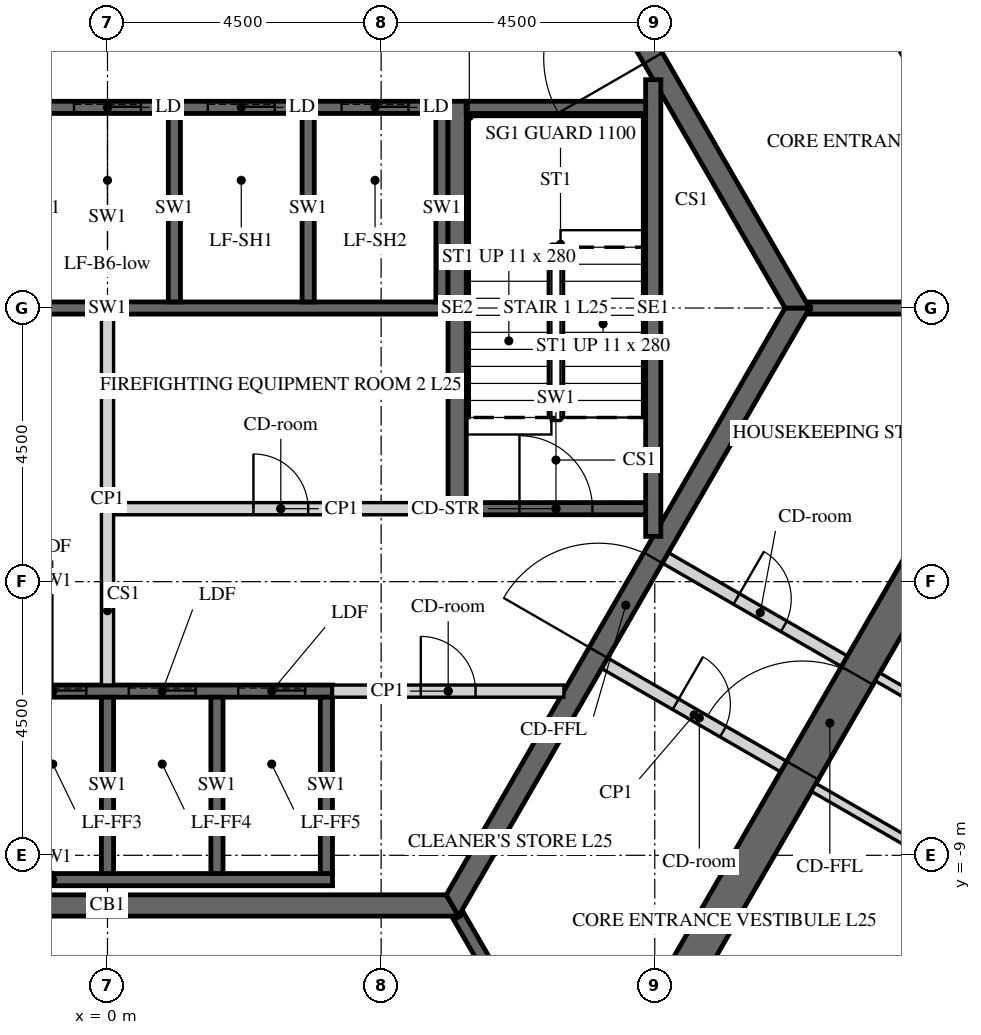
"""IFC4 building model, lengths in metres.
Left out: names, types, materials, properties, quantities, classifications, styles, units other than length and angle.
Written with IfcOpenShell. Run it as: python <this file> out.ifc"""

import sys

from ifc_helpers import new_model, si_unit, direction, frame, frame_2d, origin, place, context, subcontext, project, spatial, polyline, rectangle, outline, extrude, element, fill, save


model = new_model("IFC4")
c1 = context("Model", 3, precision=1e-05, world=origin(), true_north=direction((0.0, 1.0)))
c2 = subcontext(c1, "Body", "Model", "MODEL_VIEW")
j1 = project(units=[si_unit("LENGTHUNIT", "METRE"), si_unit("PLANEANGLEUNIT", "RADIAN")], contexts=[c1])
p1 = place(None, origin())
s1 = spatial("IfcSite", under=j1, at=p1, CompositionType="ELEMENT")
p2 = place(p1, origin())
s2 = spatial("IfcBuilding", under=s1, at=p2, CompositionType="ELEMENT")
p3 = place(p2, frame((0.0, 0.0, 111.6)))
s3 = spatial("IfcBuildingStorey", under=s2, at=p3, CompositionType="ELEMENT", Elevation=111.6)
p4 = place(p3, frame((7.91, -13.7, -0.15), z_axis=(0.0, 0.0, 1.0), x_axis=(0.499999880136, 0.866025472988, 0.0)))
e1 = element("IfcWall", 1, at=p4, inside=s3, PredefinedType="SHEAR", context=c2, shape_type="SweptSolid", body=[
    extrude(outline(polyline([(-0.173, -0.3), (15.993, -0.3), (15.646, 0.3), (0.173, 0.3), (-0.173, -0.3)])), origin(), (0.0, 0.0, 1.0), 3.9),
])
p5 = place(p4, frame((7.039, 0.0, 0.15)))
e2 = element("IfcOpeningElement", 2, at=p5, cuts=e1, PredefinedType="OPENING", context=c2, shape_type="SweptSolid", body=[
    extrude(rectangle(XDim=1.8, YDim=2.4, at=frame_2d((0.9, 1.2))), frame((0.0, 0.31, 0.0), z_axis=(0.0, -1.0, 0.0), x_axis=(1.0, 0.0, 0.0)), (0.0, 0.0, 1.0), 0.62),
])
p6 = place(p3, frame((15.819, 0.0, -0.15), z_axis=(0.0, 0.0, 1.0), x_axis=(-0.499999880136, 0.866025472988, 0.0)))
e3 = element("IfcWall", 3, at=p6, inside=s3, PredefinedType="SHEAR", context=c2, shape_type="SweptSolid", body=[
    extrude(outline(polyline([(-0.173, -0.3), (15.993, -0.3), (15.646, 0.3), (0.173, 0.3), (-0.173, -0.3)])), origin(), (0.0, 0.0, 1.0), 3.9),
])
p7 = place(p6, frame((6.981, 0.0, 0.15)))
e4 = element("IfcOpeningElement", 4, at=p7, cuts=e3, PredefinedType="OPENING", context=c2, shape_type="SweptSolid", body=[
    extrude(rectangle(XDim=1.8, YDim=2.4, at=frame_2d((0.9, 1.2))), frame((0.0, 0.31, 0.0), z_axis=(0.0, -1.0, 0.0), x_axis=(1.0, 0.0, 0.0)), (0.0, 0.0, 1.0), 0.62),
])
p8 = place(p3, frame((-5.673, -9.825, -0.15), z_axis=(0.0, 0.0, 1.0), x_axis=(1.0, 0.0, 0.0)))
e5 = element("IfcWall", 5, at=p8, inside=s3, PredefinedType="SHEAR", context=c2, shape_type="SweptSolid", body=[
    extrude(outline(polyline([(-0.101, -0.175), (11.446, -0.175), (11.244, 0.175), (0.101, 0.175), (-0.101, -0.175)])), origin(), (0.0, 0.0, 1.0), 3.9),
])
p9 = place(p3, frame((5.673, -9.825, -0.15), z_axis=(0.0, 0.0, 1.0), x_axis=(0.499995046907, 0.866028263435, 0.0)))
e6 = element("IfcWall", 6, at=p9, inside=s3, PredefinedType="SHEAR", context=c2, shape_type="SweptSolid", body=[
    extrude(outline(polyline([(-0.101, -0.175), (11.446, -0.175), (11.244, 0.175), (0.101, 0.175), (-0.101, -0.175)])), origin(), (0.0, 0.0, 1.0), 3.9),
])
p10 = place(p9, frame((4.801, 0.0, 0.15)))
e7 = element("IfcOpeningElement", 7, at=p10, cuts=e6, PredefinedType="OPENING", context=c2, shape_type="SweptSolid", body=[
    extrude(rectangle(XDim=1.8, YDim=2.4, at=frame_2d((0.9, 1.2))), frame((0.0, 0.185, 0.0), z_axis=(0.0, -1.0, 0.0), x_axis=(1.0, 0.0, 0.0)), (0.0, 0.0, 1.0), 0.37),
])
p11 = place(p3, frame((11.345, 0.0, -0.15), z_axis=(0.0, 0.0, 1.0), x_axis=(-0.499995046907, 0.866028263435, 0.0)))
e8 = element("IfcWall", 8, at=p11, inside=s3, PredefinedType="SHEAR", context=c2, shape_type="SweptSolid", body=[
    extrude(outline(polyline([(-0.101, -0.175), (11.446, -0.175), (11.244, 0.175), (0.101, 0.175), (-0.101, -0.175)])), origin(), (0.0, 0.0, 1.0), 3.9),
])
p12 = place(p11, frame((4.744, 0.0, 0.15)))
e9 = element("IfcOpeningElement", 9, at=p12, cuts=e8, PredefinedType="OPENING", context=c2, shape_type="SweptSolid", body=[
    extrude(rectangle(XDim=1.8, YDim=2.4, at=frame_2d((0.9, 1.2))), frame((0.0, 0.185, 0.0), z_axis=(0.0, -1.0, 0.0), x_axis=(1.0, 0.0, 0.0)), (0.0, 0.0, 1.0), 0.37),
])
p13 = place(p3, frame((-5.6, 3.3, -0.25), z_axis=(0.0, 0.0, 1.0), x_axis=(1.0, 0.0, 0.0)))
e10 = element("IfcWall", 10, at=p13, inside=s3, PredefinedType="SHEAR", context=c2, shape_type="SweptSolid", body=[
    extrude(rectangle(XDim=11.2, YDim=0.2, at=frame_2d((5.6, 0.0))), origin(), (0.0, 0.0, 1.0), 3.9),
])
p14 = place(p13, frame((0.65, 0.0, 0.25)))
e11 = element("IfcOpeningElement", 11, at=p14, cuts=e10, PredefinedType="OPENING", context=c2, shape_type="SweptSolid", body=[
    extrude(rectangle(XDim=1.1, YDim=2.1, at=frame_2d((0.55, 1.05))), frame((0.0, 0.11, 0.0), z_axis=(0.0, -1.0, 0.0), x_axis=(1.0, 0.0, 0.0)), (0.0, 0.0, 1.0), 0.22),
])
p15 = place(p13, frame((2.85, 0.0, 0.25)))
e12 = element("IfcOpeningElement", 12, at=p15, cuts=e10, PredefinedType="OPENING", context=c2, shape_type="SweptSolid", body=[
    extrude(rectangle(XDim=1.1, YDim=2.1, at=frame_2d((0.55, 1.05))), frame((0.0, 0.11, 0.0), z_axis=(0.0, -1.0, 0.0), x_axis=(1.0, 0.0, 0.0)), (0.0, 0.0, 1.0), 0.22),
])
p16 = place(p13, frame((5.05, 0.0, 0.25)))
e13 = element("IfcOpeningElement", 13, at=p16, cuts=e10, PredefinedType="OPENING", context=c2, shape_type="SweptSolid", body=[
    extrude(rectangle(XDim=1.1, YDim=2.1, at=frame_2d((0.55, 1.05))), frame((0.0, 0.11, 0.0), z_axis=(0.0, -1.0, 0.0), x_axis=(1.0, 0.0, 0.0)), (0.0, 0.0, 1.0), 0.22),
])
p17 = place(p13, frame((7.25, 0.0, 0.25)))
e14 = element("IfcOpeningElement", 14, at=p17, cuts=e10, PredefinedType="OPENING", context=c2, shape_type="SweptSolid", body=[
    extrude(rectangle(XDim=1.1, YDim=2.1, at=frame_2d((0.55, 1.05))), frame((0.0, 0.11, 0.0), z_axis=(0.0, -1.0, 0.0), x_axis=(1.0, 0.0, 0.0)), (0.0, 0.0, 1.0), 0.22),
])
p18 = place(p13, frame((9.45, 0.0, 0.25)))
e15 = element("IfcOpeningElement", 15, at=p18, cuts=e10, PredefinedType="OPENING", context=c2, shape_type="SweptSolid", body=[
    extrude(rectangle(XDim=1.1, YDim=2.1, at=frame_2d((0.55, 1.05))), frame((0.0, 0.11, 0.0), z_axis=(0.0, -1.0, 0.0), x_axis=(1.0, 0.0, 0.0)), (0.0, 0.0, 1.0), 0.22),
])
p19 = place(p3, frame((-5.6, 0.0, -0.25), z_axis=(0.0, 0.0, 1.0), x_axis=(1.0, 0.0, 0.0)))
e16 = element("IfcWall", 16, at=p19, inside=s3, PredefinedType="SHEAR", context=c2, shape_type="SweptSolid", body=[
    extrude(rectangle(XDim=11.2, YDim=0.2, at=frame_2d((5.6, 0.0))), origin(), (0.0, 0.0, 1.0), 3.9),
])
for number, where, z_axis, x_axis in (
    (17, (1.1, 0.1, -0.25), (0.0, 0.0, 1.0), (0.0, 1.0, 0.0)),
    (18, (3.3, 0.1, -0.25), (0.0, 0.0, 1.0), (0.0, 1.0, 0.0)),
    (19, (5.5, 0.1, -0.25), (0.0, 0.0, 1.0), (0.0, 1.0, 0.0)),
):
    element("IfcWall", number, at=place(p3, frame(where, z_axis=z_axis, x_axis=x_axis)), inside=s3, PredefinedType="SHEAR", context=c2, shape_type="SweptSolid", body=[
        extrude(rectangle(XDim=3.1, YDim=0.2, at=frame_2d((1.55, 0.0))), origin(), (0.0, 0.0, 1.0), 3.9),
    ])
p20 = place(p3, frame((-5.5, -6.3, -0.25), z_axis=(0.0, 0.0, 1.0), x_axis=(1.0, 0.0, 0.0)))
e20 = element("IfcWall", 20, at=p20, inside=s3, PredefinedType="SHEAR", context=c2, shape_type="SweptSolid", body=[
    extrude(rectangle(XDim=9.2, YDim=0.2, at=frame_2d((4.6, 0.0))), origin(), (0.0, 0.0, 1.0), 3.9),
])
p21 = place(p20, frame((0.45, 0.0, 0.25)))
e21 = element("IfcOpeningElement", 21, at=p21, cuts=e20, PredefinedType="OPENING", context=c2, shape_type="SweptSolid", body=[
    extrude(rectangle(XDim=1.1, YDim=2.1, at=frame_2d((0.55, 1.05))), frame((0.0, 0.11, 0.0), z_axis=(0.0, -1.0, 0.0), x_axis=(1.0, 0.0, 0.0)), (0.0, 0.0, 1.0), 0.22),
])
p22 = place(p20, frame((2.25, 0.0, 0.25)))
e22 = element("IfcOpeningElement", 22, at=p22, cuts=e20, PredefinedType="OPENING", context=c2, shape_type="SweptSolid", body=[
    extrude(rectangle(XDim=1.1, YDim=2.1, at=frame_2d((0.55, 1.05))), frame((0.0, 0.11, 0.0), z_axis=(0.0, -1.0, 0.0), x_axis=(1.0, 0.0, 0.0)), (0.0, 0.0, 1.0), 0.22),
])
p23 = place(p20, frame((4.05, 0.0, 0.25)))
e23 = element("IfcOpeningElement", 23, at=p23, cuts=e20, PredefinedType="OPENING", context=c2, shape_type="SweptSolid", body=[
    extrude(rectangle(XDim=1.1, YDim=2.1, at=frame_2d((0.55, 1.05))), frame((0.0, 0.11, 0.0), z_axis=(0.0, -1.0, 0.0), x_axis=(1.0, 0.0, 0.0)), (0.0, 0.0, 1.0), 0.22),
])
p24 = place(p20, frame((5.85, 0.0, 0.25)))
e24 = element("IfcOpeningElement", 24, at=p24, cuts=e20, PredefinedType="OPENING", context=c2, shape_type="SweptSolid", body=[
    extrude(rectangle(XDim=1.1, YDim=2.1, at=frame_2d((0.55, 1.05))), frame((0.0, 0.11, 0.0), z_axis=(0.0, -1.0, 0.0), x_axis=(1.0, 0.0, 0.0)), (0.0, 0.0, 1.0), 0.22),
])
p25 = place(p20, frame((7.65, 0.0, 0.25)))
e25 = element("IfcOpeningElement", 25, at=p25, cuts=e20, PredefinedType="OPENING", context=c2, shape_type="SweptSolid", body=[
    extrude(rectangle(XDim=1.1, YDim=2.1, at=frame_2d((0.55, 1.05))), frame((0.0, 0.11, 0.0), z_axis=(0.0, -1.0, 0.0), x_axis=(1.0, 0.0, 0.0)), (0.0, 0.0, 1.0), 0.22),
])
p26 = place(p3, frame((-5.5, -9.4, -0.25), z_axis=(0.0, 0.0, 1.0), x_axis=(1.0, 0.0, 0.0)))
e26 = element("IfcWall", 26, at=p26, inside=s3, PredefinedType="SHEAR", context=c2, shape_type="SweptSolid", body=[
    extrude(rectangle(XDim=9.2, YDim=0.2, at=frame_2d((4.6, 0.0))), origin(), (0.0, 0.0, 1.0), 3.9),
])
for number, where, z_axis, x_axis in (
    (27, (0.0, -9.3, -0.25), (0.0, 0.0, 1.0), (0.0, 1.0, 0.0)),
    (28, (1.8, -9.3, -0.25), (0.0, 0.0, 1.0), (0.0, 1.0, 0.0)),
    (29, (3.6, -9.3, -0.25), (0.0, 0.0, 1.0), (0.0, 1.0, 0.0)),
):
    element("IfcWall", number, at=place(p3, frame(where, z_axis=z_axis, x_axis=x_axis)), inside=s3, PredefinedType="SHEAR", context=c2, shape_type="SweptSolid", body=[
        extrude(rectangle(XDim=2.9, YDim=0.2, at=frame_2d((1.45, 0.0))), origin(), (0.0, 0.0, 1.0), 3.9),
    ])
p27 = place(p3, frame((0.1, -3.3, 0.0), z_axis=(0.0, 0.0, 1.0), x_axis=(1.0, 0.0, 0.0)))
e30 = element("IfcWall", 30, at=p27, inside=s3, PredefinedType="PARTITIONING", context=c2, shape_type="SweptSolid", body=[
    extrude(rectangle(XDim=5.5, YDim=0.2, at=frame_2d((2.75, 0.0))), origin(), (0.0, 0.0, 1.0), 3.65),
])
p28 = place(p27, frame((2.3, 0.0, 0.0)))
e31 = element("IfcOpeningElement", 31, at=p28, cuts=e30, PredefinedType="OPENING", context=c2, shape_type="SweptSolid", body=[
    extrude(rectangle(XDim=0.9, YDim=2.1, at=frame_2d((0.45, 1.05))), frame((0.0, 0.11, 0.0), z_axis=(0.0, -1.0, 0.0), x_axis=(1.0, 0.0, 0.0)), (0.0, 0.0, 1.0), 0.22),
])
p29 = place(p3, frame((0.0, -6.2, 0.0), z_axis=(0.0, 0.0, 1.0), x_axis=(0.0, 1.0, 0.0)))
e32 = element("IfcWall", 32, at=p29, inside=s3, PredefinedType="PARTITIONING", context=c2, shape_type="SweptSolid", body=[
    extrude(rectangle(XDim=6.1, YDim=0.2, at=frame_2d((3.05, 0.0))), origin(), (0.0, 0.0, 1.0), 3.65),
])
p30 = place(p3, frame((3.7, -6.3, 0.0), z_axis=(0.0, 0.0, 1.0), x_axis=(1.0, 0.0, 0.0)))
e33 = element("IfcWall", 33, at=p30, inside=s3, PredefinedType="PARTITIONING", context=c2, shape_type="SweptSolid", body=[
    extrude(rectangle(XDim=3.806, YDim=0.2, at=frame_2d((1.903, 0.0))), origin(), (0.0, 0.0, 1.0), 3.65),
])
p31 = place(p30, frame((1.453, 0.0, 0.0)))
e34 = element("IfcOpeningElement", 34, at=p31, cuts=e33, PredefinedType="OPENING", context=c2, shape_type="SweptSolid", body=[
    extrude(rectangle(XDim=0.9, YDim=2.1, at=frame_2d((0.45, 1.05))), frame((0.0, 0.11, 0.0), z_axis=(0.0, -1.0, 0.0), x_axis=(1.0, 0.0, 0.0)), (0.0, 0.0, 1.0), 0.22),
])
p32 = place(p3, frame((11.547, 0.0, -0.15), z_axis=(0.0, 0.0, 1.0), x_axis=(1.0, 0.0, 0.0)))
e35 = element("IfcWall", 35, at=p32, inside=s3, PredefinedType="SHEAR", context=c2, shape_type="SweptSolid", body=[
    extrude(rectangle(XDim=3.926, YDim=0.2, at=frame_2d((1.963, 0.0))), origin(), (0.0, 0.0, 1.0), 3.9),
])
p33 = place(p3, frame((5.773, -10.0, -0.15), z_axis=(0.0, 0.0, 1.0), x_axis=(0.500038251005, -0.86600331843, 0.0)))
e36 = element("IfcWall", 36, at=p33, inside=s3, PredefinedType="SHEAR", context=c2, shape_type="SweptSolid", body=[
    extrude(rectangle(XDim=3.926, YDim=0.2, at=frame_2d((1.963, 0.0))), origin(), (0.0, 0.0, 1.0), 3.9),
])
p34 = place(p3, frame((9.175, -4.109, 0.0), z_axis=(0.0, 0.0, 1.0), x_axis=(0.865989465428, -0.500062241894, 0.0)))
e37 = element("IfcWall", 37, at=p34, inside=s3, PredefinedType="PARTITIONING", context=c2, shape_type="SweptSolid", body=[
    extrude(rectangle(XDim=3.4, YDim=0.2, at=frame_2d((1.7, 0.0))), origin(), (0.0, 0.0, 1.0), 3.65),
])
p35 = place(p34, frame((1.351, 0.0, 0.0)))
e38 = element("IfcOpeningElement", 38, at=p35, cuts=e37, PredefinedType="OPENING", context=c2, shape_type="SweptSolid", body=[
    extrude(rectangle(XDim=0.9, YDim=2.1, at=frame_2d((0.45, 1.05))), frame((0.0, 0.11, 0.0), z_axis=(0.0, -1.0, 0.0), x_axis=(1.0, 0.0, 0.0)), (0.0, 0.0, 1.0), 0.22),
])
p36 = place(p3, frame((8.175, -5.841, 0.0), z_axis=(0.0, 0.0, 1.0), x_axis=(0.866020560687, -0.500008388397, 0.0)))
e39 = element("IfcWall", 39, at=p36, inside=s3, PredefinedType="PARTITIONING", context=c2, shape_type="SweptSolid", body=[
    extrude(rectangle(XDim=3.4, YDim=0.2, at=frame_2d((1.7, 0.0))), origin(), (0.0, 0.0, 1.0), 3.65),
])
p37 = place(p36, frame((1.35, 0.0, 0.0)))
e40 = element("IfcOpeningElement", 40, at=p37, cuts=e39, PredefinedType="OPENING", context=c2, shape_type="SweptSolid", body=[
    extrude(rectangle(XDim=0.9, YDim=2.1, at=frame_2d((0.45, 1.05))), frame((0.0, 0.11, 0.0), z_axis=(0.0, -1.0, 0.0), x_axis=(1.0, 0.0, 0.0)), (0.0, 0.0, 1.0), 0.22),
])
p38 = place(p3, frame((5.75, -3.4, -0.25), z_axis=(0.0, 0.0, 1.0), x_axis=(0.0, 1.0, 0.0)))
e41 = element("IfcWall", 41, at=p38, inside=s3, PredefinedType="SHEAR", context=c2, shape_type="SweptSolid", body=[
    extrude(rectangle(XDim=6.8, YDim=0.3, at=frame_2d((3.4, 0.0))), origin(), (0.0, 0.0, 1.0), 3.9),
])
p39 = place(p3, frame((8.975, -3.755, -0.25), z_axis=(0.0, 0.0, 1.0), x_axis=(0.0, 1.0, 0.0)))
e42 = element("IfcWall", 42, at=p39, inside=s3, PredefinedType="SHEAR", context=c2, shape_type="SweptSolid", body=[
    extrude(rectangle(XDim=7.51, YDim=0.25, at=frame_2d((3.755, 0.0))), origin(), (0.0, 0.0, 1.0), 3.9),
])
p40 = place(p3, frame((5.9, 3.3, -0.25), z_axis=(0.0, 0.0, 1.0), x_axis=(1.0, 0.0, 0.0)))
e43 = element("IfcWall", 43, at=p40, inside=s3, PredefinedType="SHEAR", context=c2, shape_type="SweptSolid", body=[
    extrude(rectangle(XDim=2.95, YDim=0.2, at=frame_2d((1.475, 0.0))), origin(), (0.0, 0.0, 1.0), 3.9),
])
p41 = place(p3, frame((5.9, -3.3, -0.25), z_axis=(0.0, 0.0, 1.0), x_axis=(1.0, 0.0, 0.0)))
e44 = element("IfcWall", 44, at=p41, inside=s3, PredefinedType="SHEAR", context=c2, shape_type="SweptSolid", body=[
    extrude(rectangle(XDim=2.95, YDim=0.2, at=frame_2d((1.475, 0.0))), origin(), (0.0, 0.0, 1.0), 3.9),
])
p42 = place(p41, frame((0.875, 0.0, 0.25)))
e45 = element("IfcOpeningElement", 45, at=p42, cuts=e44, PredefinedType="OPENING", context=c2, shape_type="SweptSolid", body=[
    extrude(rectangle(XDim=1.2, YDim=2.4, at=frame_2d((0.6, 1.2))), frame((0.0, 0.11, 0.0), z_axis=(0.0, -1.0, 0.0), x_axis=(1.0, 0.0, 0.0)), (0.0, 0.0, 1.0), 0.22),
])
p43 = place(p3, frame((17.925, -9.103, 0.0), z_axis=(0.0, 0.0, 1.0), x_axis=(-0.866013586754, 0.500020467139, 0.0)))
e46 = element("IfcWall", 46, at=p43, inside=s3, PredefinedType="PARTITIONING", context=c2, shape_type="SweptSolid", body=[
    extrude(rectangle(XDim=6.075, YDim=0.15, at=frame_2d((3.038, 0.0))), origin(), (0.0, 0.0, 1.0), 2.988),
])
p44 = place(p3, frame((11.614, -7.884, 0.0), z_axis=(0.0, 0.0, 1.0), x_axis=(0.866033542371, -0.499985903289, 0.0)))
e47 = element("IfcWall", 47, at=p44, inside=s3, PredefinedType="PARTITIONING", context=c2, shape_type="SweptSolid", body=[
    extrude(rectangle(XDim=6.15, YDim=0.15, at=frame_2d((3.075, 0.0))), origin(), (0.0, 0.0, 1.0), 2.988),
])
p45 = place(p5, origin())
e48 = element("IfcDoor", 48, at=p45, inside=s3, OperationType="DOUBLE_DOOR_SINGLE_SWING", PredefinedType="DOOR", context=c2, shape_type="SweptSolid", body=[
    extrude(rectangle(XDim=1.8, YDim=2.4, at=frame_2d((0.9, 1.2))), frame((0.0, 0.025, 0.0), z_axis=(0.0, -1.0, 0.0), x_axis=(1.0, 0.0, 0.0)), (0.0, 0.0, 1.0), 0.05),
])
fill(e2, e48)
p46 = place(p12, origin())
e49 = element("IfcDoor", 49, at=p46, inside=s3, OperationType="DOUBLE_DOOR_SINGLE_SWING", PredefinedType="DOOR", context=c2, shape_type="SweptSolid", body=[
    extrude(rectangle(XDim=1.8, YDim=2.4, at=frame_2d((0.9, 1.2))), frame((0.0, 0.025, 0.0), z_axis=(0.0, -1.0, 0.0), x_axis=(1.0, 0.0, 0.0)), (0.0, 0.0, 1.0), 0.05),
])
fill(e9, e49)
p47 = place(p10, origin())
e50 = element("IfcDoor", 50, at=p47, inside=s3, OperationType="DOUBLE_DOOR_SINGLE_SWING", PredefinedType="DOOR", context=c2, shape_type="SweptSolid", body=[
    extrude(rectangle(XDim=1.8, YDim=2.4, at=frame_2d((0.9, 1.2))), frame((0.0, 0.025, 0.0), z_axis=(0.0, -1.0, 0.0), x_axis=(1.0, 0.0, 0.0)), (0.0, 0.0, 1.0), 0.05),
])
fill(e7, e50)
p48 = place(p28, origin())
e51 = element("IfcDoor", 51, at=p48, inside=s3, OperationType="SINGLE_SWING_LEFT", PredefinedType="DOOR", context=c2, shape_type="SweptSolid", body=[
    extrude(rectangle(XDim=0.9, YDim=2.1, at=frame_2d((0.45, 1.05))), frame((0.0, 0.025, 0.0), z_axis=(0.0, -1.0, 0.0), x_axis=(1.0, 0.0, 0.0)), (0.0, 0.0, 1.0), 0.05),
])
fill(e31, e51)
p49 = place(p31, origin())
e52 = element("IfcDoor", 52, at=p49, inside=s3, OperationType="SINGLE_SWING_LEFT", PredefinedType="DOOR", context=c2, shape_type="SweptSolid", body=[
    extrude(rectangle(XDim=0.9, YDim=2.1, at=frame_2d((0.45, 1.05))), frame((0.0, 0.025, 0.0), z_axis=(0.0, -1.0, 0.0), x_axis=(1.0, 0.0, 0.0)), (0.0, 0.0, 1.0), 0.05),
])
fill(e34, e52)
p50 = place(p35, origin())
e53 = element("IfcDoor", 53, at=p50, inside=s3, OperationType="SINGLE_SWING_LEFT", PredefinedType="DOOR", context=c2, shape_type="SweptSolid", body=[
    extrude(rectangle(XDim=0.9, YDim=2.1, at=frame_2d((0.45, 1.05))), frame((0.0, 0.025, 0.0), z_axis=(0.0, -1.0, 0.0), x_axis=(1.0, 0.0, 0.0)), (0.0, 0.0, 1.0), 0.05),
])
fill(e38, e53)
p51 = place(p37, origin())
e54 = element("IfcDoor", 54, at=p51, inside=s3, OperationType="SINGLE_SWING_LEFT", PredefinedType="DOOR", context=c2, shape_type="SweptSolid", body=[
    extrude(rectangle(XDim=0.9, YDim=2.1, at=frame_2d((0.45, 1.05))), frame((0.0, 0.025, 0.0), z_axis=(0.0, -1.0, 0.0), x_axis=(1.0, 0.0, 0.0)), (0.0, 0.0, 1.0), 0.05),
])
fill(e40, e54)
p52 = place(p42, origin())
e55 = element("IfcDoor", 55, at=p52, inside=s3, OperationType="SINGLE_SWING_LEFT", PredefinedType="DOOR", context=c2, shape_type="SweptSolid", body=[
    extrude(rectangle(XDim=1.2, YDim=2.4, at=frame_2d((0.6, 1.2))), frame((0.0, 0.025, 0.0), z_axis=(0.0, -1.0, 0.0), x_axis=(1.0, 0.0, 0.0)), (0.0, 0.0, 1.0), 0.05),
])
fill(e45, e55)
p53 = place(p16, origin())
e56 = element("IfcDoor", 56, at=p53, inside=s3, OperationType="SLIDING_TO_LEFT", PredefinedType="DOOR", context=c2, shape_type="SweptSolid", body=[
    extrude(rectangle(XDim=1.1, YDim=2.1, at=frame_2d((0.55, 1.05))), frame((0.0, 0.025, 0.0), z_axis=(0.0, -1.0, 0.0), x_axis=(1.0, 0.0, 0.0)), (0.0, 0.0, 1.0), 0.05),
])
fill(e13, e56)
p54 = place(p17, origin())
e57 = element("IfcDoor", 57, at=p54, inside=s3, OperationType="SLIDING_TO_LEFT", PredefinedType="DOOR", context=c2, shape_type="SweptSolid", body=[
    extrude(rectangle(XDim=1.1, YDim=2.1, at=frame_2d((0.55, 1.05))), frame((0.0, 0.025, 0.0), z_axis=(0.0, -1.0, 0.0), x_axis=(1.0, 0.0, 0.0)), (0.0, 0.0, 1.0), 0.05),
])
fill(e14, e57)
p55 = place(p18, origin())
e58 = element("IfcDoor", 58, at=p55, inside=s3, OperationType="SLIDING_TO_LEFT", PredefinedType="DOOR", context=c2, shape_type="SweptSolid", body=[
    extrude(rectangle(XDim=1.1, YDim=2.1, at=frame_2d((0.55, 1.05))), frame((0.0, 0.025, 0.0), z_axis=(0.0, -1.0, 0.0), x_axis=(1.0, 0.0, 0.0)), (0.0, 0.0, 1.0), 0.05),
])
fill(e15, e58)
p56 = place(p23, origin())
e59 = element("IfcDoor", 59, at=p56, inside=s3, OperationType="SLIDING_TO_LEFT", PredefinedType="DOOR", context=c2, shape_type="SweptSolid", body=[
    extrude(rectangle(XDim=1.1, YDim=2.1, at=frame_2d((0.55, 1.05))), frame((0.0, 0.025, 0.0), z_axis=(0.0, -1.0, 0.0), x_axis=(1.0, 0.0, 0.0)), (0.0, 0.0, 1.0), 0.05),
])
fill(e23, e59)
p57 = place(p24, origin())
e60 = element("IfcDoor", 60, at=p57, inside=s3, OperationType="SLIDING_TO_LEFT", PredefinedType="DOOR", context=c2, shape_type="SweptSolid", body=[
    extrude(rectangle(XDim=1.1, YDim=2.1, at=frame_2d((0.55, 1.05))), frame((0.0, 0.025, 0.0), z_axis=(0.0, -1.0, 0.0), x_axis=(1.0, 0.0, 0.0)), (0.0, 0.0, 1.0), 0.05),
])
fill(e24, e60)
p58 = place(p25, origin())
e61 = element("IfcDoor", 61, at=p58, inside=s3, OperationType="SLIDING_TO_LEFT", PredefinedType="DOOR", context=c2, shape_type="SweptSolid", body=[
    extrude(rectangle(XDim=1.1, YDim=2.1, at=frame_2d((0.55, 1.05))), frame((0.0, 0.025, 0.0), z_axis=(0.0, -1.0, 0.0), x_axis=(1.0, 0.0, 0.0)), (0.0, 0.0, 1.0), 0.05),
])
fill(e25, e61)
save(model, sys.argv[1])
